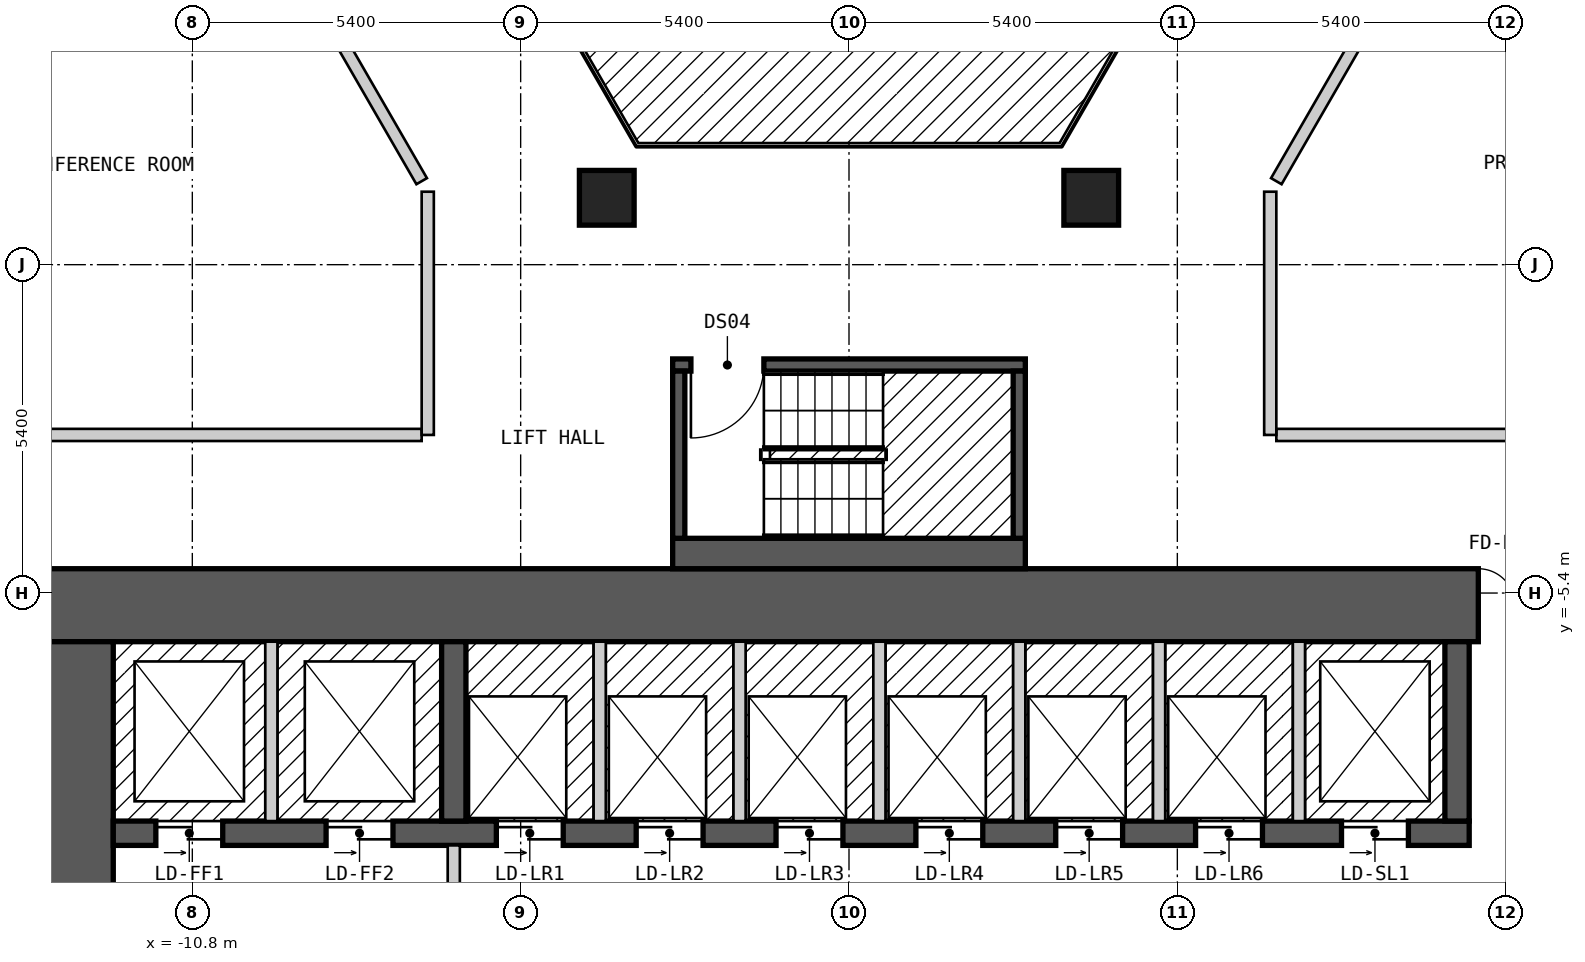
"""IFC4 building model, lengths in metres.
Left out: names, types, materials, properties, quantities, classifications, styles, units other than length and angle.
Written with IfcOpenShell. Run it as: python <this file> out.ifc"""

import sys

from ifc_helpers import new_model, si_unit, direction, frame, frame_2d, origin, origin_2d, place, context, subcontext, project, spatial, rectangle, extrude, element, fill, save


model = new_model("IFC4")
c1 = context("Model", 3, precision=1e-05, world=origin(), true_north=direction((0.0, 1.0)))
c2 = subcontext(c1, "Body", "Model", "MODEL_VIEW")
j1 = project(units=[si_unit("LENGTHUNIT", "METRE"), si_unit("PLANEANGLEUNIT", "RADIAN")], contexts=[c1])
p1 = place(None, origin())
s1 = spatial("IfcSite", under=j1, at=p1, CompositionType="ELEMENT")
p2 = place(p1, origin())
s2 = spatial("IfcBuilding", under=s1, at=p2, CompositionType="ELEMENT")
p3 = place(p2, frame((0.0, 0.0, 56.4)))
s3 = spatial("IfcBuildingStorey", under=s2, at=p3, CompositionType="ELEMENT", Elevation=56.4)
for number, where, z_axis, x_axis in (
    (1, (3.984, 1.1, 0.0), (0.0, 0.0, 1.0), (1.0, 0.0, 0.0)),
    (2, (-3.984, 1.1, 0.0), (0.0, 0.0, 1.0), (1.0, 0.0, 0.0)),
):
    element("IfcColumn", number, at=place(p3, frame(where, z_axis=z_axis, x_axis=x_axis)), inside=s3, PredefinedType="COLUMN", context=c2, shape_type="SweptSolid", body=[
        extrude(rectangle(XDim=0.9, YDim=0.9, at=origin_2d()), origin(), (0.0, 0.0, 1.0), 3.0),
    ])
p4 = place(p3, frame((-13.3, -5.6, 0.0), z_axis=(0.0, 0.0, 1.0), x_axis=(1.0, 0.0, 0.0)))
e3 = element("IfcWall", 3, at=p4, inside=s3, PredefinedType="SHEAR", context=c2, shape_type="SweptSolid", body=[
    extrude(rectangle(XDim=26.6, YDim=1.2, at=frame_2d((13.3, 0.0))), origin(), (0.0, 0.0, 1.0), 2.7),
])
p5 = place(p4, frame((23.65, 0.0, 0.0)))
e4 = element("IfcOpeningElement", 4, at=p5, cuts=e3, PredefinedType="OPENING", context=c2, shape_type="SweptSolid", body=[
    extrude(rectangle(XDim=1.2, YDim=2.1, at=frame_2d((0.6, 1.05))), frame((0.0, 0.61, 0.0), z_axis=(0.0, -1.0, 0.0), x_axis=(1.0, 0.0, 0.0)), (0.0, 0.0, 1.0), 1.22),
])
p6 = place(p3, frame((-12.7, -17.8, 0.0), z_axis=(0.0, 0.0, 1.0), x_axis=(0.0, 1.0, 0.0)))
e5 = element("IfcWall", 5, at=p6, inside=s3, PredefinedType="SHEAR", context=c2, shape_type="SweptSolid", body=[
    extrude(rectangle(XDim=11.6, YDim=1.2, at=frame_2d((5.8, 0.0))), origin(), (0.0, 0.0, 1.0), 2.7),
])
p7 = place(p6, frame((3.6, 0.0, 0.0)))
e6 = element("IfcOpeningElement", 6, at=p7, cuts=e5, PredefinedType="OPENING", context=c2, shape_type="SweptSolid", body=[
    extrude(rectangle(XDim=1.2, YDim=2.1, at=frame_2d((0.6, 1.05))), frame((0.0, 0.61, 0.0), z_axis=(0.0, -1.0, 0.0), x_axis=(1.0, 0.0, 0.0)), (0.0, 0.0, 1.0), 1.22),
])
p8 = place(p3, frame((-12.1, -9.35, 0.0), z_axis=(0.0, 0.0, 1.0), x_axis=(1.0, 0.0, 0.0)))
e7 = element("IfcWall", 7, at=p8, inside=s3, PredefinedType="SHEAR", context=c2, shape_type="SweptSolid", body=[
    extrude(rectangle(XDim=22.3, YDim=0.4, at=frame_2d((11.15, 0.0))), origin(), (0.0, 0.0, 1.0), 2.7),
])
p9 = place(p8, frame((0.7, 0.0, 0.0)))
e8 = element("IfcOpeningElement", 8, at=p9, cuts=e7, PredefinedType="OPENING", context=c2, shape_type="SweptSolid", body=[
    extrude(rectangle(XDim=1.1, YDim=2.1, at=frame_2d((0.55, 1.05))), frame((0.0, 0.21, 0.0), z_axis=(0.0, -1.0, 0.0), x_axis=(1.0, 0.0, 0.0)), (0.0, 0.0, 1.0), 0.42),
])
p10 = place(p8, frame((3.5, 0.0, 0.0)))
e9 = element("IfcOpeningElement", 9, at=p10, cuts=e7, PredefinedType="OPENING", context=c2, shape_type="SweptSolid", body=[
    extrude(rectangle(XDim=1.1, YDim=2.1, at=frame_2d((0.55, 1.05))), frame((0.0, 0.21, 0.0), z_axis=(0.0, -1.0, 0.0), x_axis=(1.0, 0.0, 0.0)), (0.0, 0.0, 1.0), 0.42),
])
p11 = place(p8, frame((6.3, 0.0, 0.0)))
e10 = element("IfcOpeningElement", 10, at=p11, cuts=e7, PredefinedType="OPENING", context=c2, shape_type="SweptSolid", body=[
    extrude(rectangle(XDim=1.1, YDim=2.1, at=frame_2d((0.55, 1.05))), frame((0.0, 0.21, 0.0), z_axis=(0.0, -1.0, 0.0), x_axis=(1.0, 0.0, 0.0)), (0.0, 0.0, 1.0), 0.42),
])
p12 = place(p8, frame((8.6, 0.0, 0.0)))
e11 = element("IfcOpeningElement", 11, at=p12, cuts=e7, PredefinedType="OPENING", context=c2, shape_type="SweptSolid", body=[
    extrude(rectangle(XDim=1.1, YDim=2.1, at=frame_2d((0.55, 1.05))), frame((0.0, 0.21, 0.0), z_axis=(0.0, -1.0, 0.0), x_axis=(1.0, 0.0, 0.0)), (0.0, 0.0, 1.0), 0.42),
])
p13 = place(p8, frame((10.9, 0.0, 0.0)))
e12 = element("IfcOpeningElement", 12, at=p13, cuts=e7, PredefinedType="OPENING", context=c2, shape_type="SweptSolid", body=[
    extrude(rectangle(XDim=1.1, YDim=2.1, at=frame_2d((0.55, 1.05))), frame((0.0, 0.21, 0.0), z_axis=(0.0, -1.0, 0.0), x_axis=(1.0, 0.0, 0.0)), (0.0, 0.0, 1.0), 0.42),
])
p14 = place(p8, frame((13.2, 0.0, 0.0)))
e13 = element("IfcOpeningElement", 13, at=p14, cuts=e7, PredefinedType="OPENING", context=c2, shape_type="SweptSolid", body=[
    extrude(rectangle(XDim=1.1, YDim=2.1, at=frame_2d((0.55, 1.05))), frame((0.0, 0.21, 0.0), z_axis=(0.0, -1.0, 0.0), x_axis=(1.0, 0.0, 0.0)), (0.0, 0.0, 1.0), 0.42),
])
p15 = place(p8, frame((15.5, 0.0, 0.0)))
e14 = element("IfcOpeningElement", 14, at=p15, cuts=e7, PredefinedType="OPENING", context=c2, shape_type="SweptSolid", body=[
    extrude(rectangle(XDim=1.1, YDim=2.1, at=frame_2d((0.55, 1.05))), frame((0.0, 0.21, 0.0), z_axis=(0.0, -1.0, 0.0), x_axis=(1.0, 0.0, 0.0)), (0.0, 0.0, 1.0), 0.42),
])
p16 = place(p8, frame((17.8, 0.0, 0.0)))
e15 = element("IfcOpeningElement", 15, at=p16, cuts=e7, PredefinedType="OPENING", context=c2, shape_type="SweptSolid", body=[
    extrude(rectangle(XDim=1.1, YDim=2.1, at=frame_2d((0.55, 1.05))), frame((0.0, 0.21, 0.0), z_axis=(0.0, -1.0, 0.0), x_axis=(1.0, 0.0, 0.0)), (0.0, 0.0, 1.0), 0.42),
])
p17 = place(p8, frame((20.2, 0.0, 0.0)))
e16 = element("IfcOpeningElement", 16, at=p17, cuts=e7, PredefinedType="OPENING", context=c2, shape_type="SweptSolid", body=[
    extrude(rectangle(XDim=1.1, YDim=2.1, at=frame_2d((0.55, 1.05))), frame((0.0, 0.21, 0.0), z_axis=(0.0, -1.0, 0.0), x_axis=(1.0, 0.0, 0.0)), (0.0, 0.0, 1.0), 0.42),
])
for number, where, z_axis, x_axis in (
    (17, (-6.5, -9.15, 0.0), (0.0, 0.0, 1.0), (0.0, 1.0, 0.0)),
    (18, (10.0, -9.15, 0.0), (0.0, 0.0, 1.0), (0.0, 1.0, 0.0)),
):
    element("IfcWall", number, at=place(p3, frame(where, z_axis=z_axis, x_axis=x_axis)), inside=s3, PredefinedType="SHEAR", context=c2, shape_type="SweptSolid", body=[
        extrude(rectangle(XDim=2.95, YDim=0.4, at=frame_2d((1.475, 0.0))), origin(), (0.0, 0.0, 1.0), 2.7),
    ])
p18 = place(p3, frame((-2.9, -4.75, 0.0), z_axis=(0.0, 0.0, 1.0), x_axis=(1.0, 0.0, 0.0)))
e19 = element("IfcWall", 19, at=p18, inside=s3, PredefinedType="SOLIDWALL", context=c2, shape_type="SweptSolid", body=[
    extrude(rectangle(XDim=5.8, YDim=0.5, at=frame_2d((2.9, 0.0))), origin(), (0.0, 0.0, 1.0), 2.7),
])
p19 = place(p3, frame((-2.9, -1.65, 0.0), z_axis=(0.0, 0.0, 1.0), x_axis=(1.0, 0.0, 0.0)))
e20 = element("IfcWall", 20, at=p19, inside=s3, PredefinedType="SOLIDWALL", context=c2, shape_type="SweptSolid", body=[
    extrude(rectangle(XDim=5.8, YDim=0.2, at=frame_2d((2.9, 0.0))), origin(), (0.0, 0.0, 1.0), 2.7),
])
p20 = place(p19, frame((0.3, 0.0, 0.0)))
e21 = element("IfcOpeningElement", 21, at=p20, cuts=e20, PredefinedType="OPENING", context=c2, shape_type="SweptSolid", body=[
    extrude(rectangle(XDim=1.2, YDim=2.1, at=frame_2d((0.6, 1.05))), frame((0.0, 0.11, 0.0), z_axis=(0.0, -1.0, 0.0), x_axis=(1.0, 0.0, 0.0)), (0.0, 0.0, 1.0), 0.22),
])
for number, where, z_axis, x_axis in (
    (22, (-2.8, -4.5, 0.0), (0.0, 0.0, 1.0), (0.0, 1.0, 0.0)),
    (23, (2.8, -4.5, 0.0), (0.0, 0.0, 1.0), (0.0, 1.0, 0.0)),
):
    element("IfcWall", number, at=place(p3, frame(where, z_axis=z_axis, x_axis=x_axis)), inside=s3, PredefinedType="SOLIDWALL", context=c2, shape_type="SweptSolid", body=[
        extrude(rectangle(XDim=2.75, YDim=0.2, at=frame_2d((1.375, 0.0))), origin(), (0.0, 0.0, 1.0), 2.7),
    ])
p21 = place(p3, frame((-10.796, 7.9, 0.0), z_axis=(0.0, 0.0, 1.0), x_axis=(0.499954271211, -0.866051803703, 0.0)))
e24 = element("IfcWall", 24, at=p21, inside=s3, PredefinedType="PARTITIONING", context=c2, shape_type="SweptSolid", body=[
    extrude(rectangle(XDim=7.536, YDim=0.2, at=frame_2d((3.768, 0.0))), origin(), (0.0, 0.0, 1.0), 2.7),
])
p22 = place(p3, frame((9.18, 15.7, 0.0), z_axis=(0.0, 0.0, 1.0), x_axis=(0.500003652032, -0.866023295272, 0.0)))
e25 = element("IfcWall", 25, at=p22, inside=s3, PredefinedType="PARTITIONING", context=c2, shape_type="SweptSolid", body=[
    extrude(rectangle(XDim=18.012, YDim=0.2, at=frame_2d((9.006, 0.0))), origin(), (0.0, 0.0, 1.0), 2.7),
])
p23 = place(p22, frame((8.556, 0.0, 0.0)))
e26 = element("IfcOpeningElement", 26, at=p23, cuts=e25, PredefinedType="OPENING", context=c2, shape_type="SweptSolid", body=[
    extrude(rectangle(XDim=0.9, YDim=2.1, at=frame_2d((0.45, 1.05))), frame((0.0, 0.11, 0.0), z_axis=(0.0, -1.0, 0.0), x_axis=(1.0, 0.0, 0.0)), (0.0, 0.0, 1.0), 0.22),
])
p24 = place(p3, frame((10.45, 17.9, 0.0), z_axis=(0.0, 0.0, 1.0), x_axis=(0.500034352617, -0.866005569383, 0.0)))
e27 = element("IfcWall", 27, at=p24, inside=s3, PredefinedType="PARTITIONING", context=c2, shape_type="SweptSolid", body=[
    extrude(rectangle(XDim=20.553, YDim=0.2, at=frame_2d((10.276, 0.0))), origin(), (0.0, 0.0, 1.0), 2.7),
])
p25 = place(p24, frame((14.902, 0.0, 0.0)))
e28 = element("IfcOpeningElement", 28, at=p25, cuts=e27, PredefinedType="OPENING", context=c2, shape_type="SweptSolid", body=[
    extrude(rectangle(XDim=1.0, YDim=2.1, at=frame_2d((0.5, 1.05))), frame((0.0, 0.11, 0.0), z_axis=(0.0, -1.0, 0.0), x_axis=(1.0, 0.0, 0.0)), (0.0, 0.0, 1.0), 0.22),
])
p26 = place(p24, frame((4.671, 0.0, 0.0)))
e29 = element("IfcOpeningElement", 29, at=p26, cuts=e27, PredefinedType="OPENING", context=c2, shape_type="SweptSolid", body=[
    extrude(rectangle(XDim=1.0, YDim=2.1, at=frame_2d((0.5, 1.05))), frame((0.0, 0.11, 0.0), z_axis=(0.0, -1.0, 0.0), x_axis=(1.0, 0.0, 0.0)), (0.0, 0.0, 1.0), 0.22),
])
for number, where, z_axis, x_axis in (
    (30, (-15.4, -2.8, 0.0), (0.0, 0.0, 1.0), (1.0, 0.0, 0.0)),
    (31, (7.028, -2.8, 0.0), (0.0, 0.0, 1.0), (1.0, 0.0, 0.0)),
):
    element("IfcWall", number, at=place(p3, frame(where, z_axis=z_axis, x_axis=x_axis)), inside=s3, PredefinedType="PARTITIONING", context=c2, shape_type="SweptSolid", body=[
        extrude(rectangle(XDim=8.372, YDim=0.2, at=frame_2d((4.186, 0.0))), origin(), (0.0, 0.0, 1.0), 2.7),
    ])
p27 = place(p3, frame((7.028, 1.373, 0.0), z_axis=(0.0, 0.0, 1.0), x_axis=(0.49998574534, 0.86603363356, 0.0)))
e32 = element("IfcWall", 32, at=p27, inside=s3, PredefinedType="PARTITIONING", context=c2, shape_type="SweptSolid", body=[
    extrude(rectangle(XDim=7.652, YDim=0.2, at=frame_2d((3.826, 0.0))), origin(), (0.0, 0.0, 1.0), 2.7),
])
p28 = place(p3, frame((-18.244, -0.001, 0.0), z_axis=(0.0, 0.0, 1.0), x_axis=(0.499962999376, 0.866046765051, 0.0)))
e33 = element("IfcWall", 33, at=p28, inside=s3, PredefinedType="PARTITIONING", context=c2, shape_type="SweptSolid", body=[
    extrude(rectangle(XDim=18.245, YDim=0.2, at=frame_2d((9.123, 0.0))), origin(), (0.0, 0.0, 1.0), 2.7),
])
p29 = place(p28, frame((8.672, 0.0, 0.0)))
e34 = element("IfcOpeningElement", 34, at=p29, cuts=e33, PredefinedType="OPENING", context=c2, shape_type="SweptSolid", body=[
    extrude(rectangle(XDim=0.9, YDim=2.1, at=frame_2d((0.45, 1.05))), frame((0.0, 0.11, 0.0), z_axis=(0.0, -1.0, 0.0), x_axis=(1.0, 0.0, 0.0)), (0.0, 0.0, 1.0), 0.22),
])
p30 = place(p3, frame((-20.727, 0.099, 0.0), z_axis=(0.0, 0.0, 1.0), x_axis=(0.499993204491, 0.866029327138, 0.0)))
e35 = element("IfcWall", 35, at=p30, inside=s3, PredefinedType="PARTITIONING", context=c2, shape_type="SweptSolid", body=[
    extrude(rectangle(XDim=20.554, YDim=0.2, at=frame_2d((10.277, 0.0))), origin(), (0.0, 0.0, 1.0), 2.7),
])
p31 = place(p30, frame((9.776, 0.0, 0.0)))
e36 = element("IfcOpeningElement", 36, at=p31, cuts=e35, PredefinedType="OPENING", context=c2, shape_type="SweptSolid", body=[
    extrude(rectangle(XDim=1.0, YDim=2.1, at=frame_2d((0.5, 1.05))), frame((0.0, 0.11, 0.0), z_axis=(0.0, -1.0, 0.0), x_axis=(1.0, 0.0, 0.0)), (0.0, 0.0, 1.0), 0.22),
])
p32 = place(p30, frame((4.673, 0.0, 0.0)))
e37 = element("IfcOpeningElement", 37, at=p32, cuts=e35, PredefinedType="OPENING", context=c2, shape_type="SweptSolid", body=[
    extrude(rectangle(XDim=1.0, YDim=2.1, at=frame_2d((0.5, 1.05))), frame((0.0, 0.11, 0.0), z_axis=(0.0, -1.0, 0.0), x_axis=(1.0, 0.0, 0.0)), (0.0, 0.0, 1.0), 0.22),
])
p33 = place(p30, frame((14.88, 0.0, 0.0)))
e38 = element("IfcOpeningElement", 38, at=p33, cuts=e35, PredefinedType="OPENING", context=c2, shape_type="SweptSolid", body=[
    extrude(rectangle(XDim=1.0, YDim=2.1, at=frame_2d((0.5, 1.05))), frame((0.0, 0.11, 0.0), z_axis=(0.0, -1.0, 0.0), x_axis=(1.0, 0.0, 0.0)), (0.0, 0.0, 1.0), 0.22),
])
for number, where, z_axis, x_axis in (
    (39, (6.928, -2.8, 0.0), (0.0, 0.0, 1.0), (0.0, 1.0, 0.0)),
    (40, (-6.928, -2.8, 0.0), (0.0, 0.0, 1.0), (0.0, 1.0, 0.0)),
):
    element("IfcWall", number, at=place(p3, frame(where, z_axis=z_axis, x_axis=x_axis)), inside=s3, PredefinedType="PARTITIONING", context=c2, shape_type="SweptSolid", body=[
        extrude(rectangle(XDim=4.0, YDim=0.2, at=frame_2d((2.0, 0.0))), origin(), (0.0, 0.0, 1.0), 2.7),
    ])
p34 = place(p3, frame((-9.5, -9.15, 0.0), z_axis=(0.0, 0.0, 1.0), x_axis=(0.0, 1.0, 0.0)))
e41 = element("IfcWall", 41, at=p34, inside=s3, PredefinedType="SOLIDWALL", context=c2, shape_type="SweptSolid", body=[
    extrude(rectangle(XDim=2.95, YDim=0.2, at=frame_2d((1.475, 0.0))), origin(), (0.0, 0.0, 1.0), 2.7),
])
p35 = place(p3, frame((-6.5, -14.45, 0.0), z_axis=(0.0, 0.0, 1.0), x_axis=(0.0, 1.0, 0.0)))
e42 = element("IfcWall", 42, at=p35, inside=s3, PredefinedType="PARTITIONING", context=c2, shape_type="SweptSolid", body=[
    extrude(rectangle(XDim=4.9, YDim=0.2, at=frame_2d((2.45, 0.0))), origin(), (0.0, 0.0, 1.0), 2.7),
])
p36 = place(p35, frame((3.15, 0.0, 0.0), z_axis=(0.0, 0.0, 1.0), x_axis=(-1.0, 0.0, 0.0)))
e43 = element("IfcOpeningElement", 43, at=p36, cuts=e42, PredefinedType="OPENING", context=c2, shape_type="SweptSolid", body=[
    extrude(rectangle(XDim=1.4, YDim=2.1, at=frame_2d((0.7, 1.05))), frame((0.0, 0.11, 0.0), z_axis=(0.0, -1.0, 0.0), x_axis=(1.0, 0.0, 0.0)), (0.0, 0.0, 1.0), 0.22),
])
for number, where, z_axis, x_axis in (
    (44, (-4.1, -9.15, 0.0), (0.0, 0.0, 1.0), (0.0, 1.0, 0.0)),
    (45, (-1.8, -9.15, 0.0), (0.0, 0.0, 1.0), (0.0, 1.0, 0.0)),
    (46, (0.5, -9.15, 0.0), (0.0, 0.0, 1.0), (0.0, 1.0, 0.0)),
    (47, (2.8, -9.15, 0.0), (0.0, 0.0, 1.0), (0.0, 1.0, 0.0)),
    (48, (5.1, -9.15, 0.0), (0.0, 0.0, 1.0), (0.0, 1.0, 0.0)),
    (49, (7.4, -9.15, 0.0), (0.0, 0.0, 1.0), (0.0, 1.0, 0.0)),
):
    element("IfcWall", number, at=place(p3, frame(where, z_axis=z_axis, x_axis=x_axis)), inside=s3, PredefinedType="SOLIDWALL", context=c2, shape_type="SweptSolid", body=[
        extrude(rectangle(XDim=2.95, YDim=0.2, at=frame_2d((1.475, 0.0))), origin(), (0.0, 0.0, 1.0), 2.7),
    ])
p37 = place(p20, origin())
e50 = element("IfcDoor", 50, at=p37, inside=s3, OperationType="SINGLE_SWING_LEFT", PredefinedType="DOOR", context=c2, shape_type="SweptSolid", body=[
    extrude(rectangle(XDim=1.2, YDim=2.1, at=frame_2d((0.6, 1.05))), frame((0.0, 0.025, 0.0), z_axis=(0.0, -1.0, 0.0), x_axis=(1.0, 0.0, 0.0)), (0.0, 0.0, 1.0), 0.05),
])
fill(e21, e50)
p38 = place(p9, origin())
e51 = element("IfcDoor", 51, at=p38, inside=s3, OperationType="DOUBLE_DOOR_SLIDING", PredefinedType="DOOR", context=c2, shape_type="SweptSolid", body=[
    extrude(rectangle(XDim=1.1, YDim=2.1, at=frame_2d((0.55, 1.05))), frame((0.0, 0.025, 0.0), z_axis=(0.0, -1.0, 0.0), x_axis=(1.0, 0.0, 0.0)), (0.0, 0.0, 1.0), 0.05),
])
fill(e8, e51)
p39 = place(p10, origin())
e52 = element("IfcDoor", 52, at=p39, inside=s3, OperationType="DOUBLE_DOOR_SLIDING", PredefinedType="DOOR", context=c2, shape_type="SweptSolid", body=[
    extrude(rectangle(XDim=1.1, YDim=2.1, at=frame_2d((0.55, 1.05))), frame((0.0, 0.025, 0.0), z_axis=(0.0, -1.0, 0.0), x_axis=(1.0, 0.0, 0.0)), (0.0, 0.0, 1.0), 0.05),
])
fill(e9, e52)
p40 = place(p11, origin())
e53 = element("IfcDoor", 53, at=p40, inside=s3, OperationType="DOUBLE_DOOR_SLIDING", PredefinedType="DOOR", context=c2, shape_type="SweptSolid", body=[
    extrude(rectangle(XDim=1.1, YDim=2.1, at=frame_2d((0.55, 1.05))), frame((0.0, 0.025, 0.0), z_axis=(0.0, -1.0, 0.0), x_axis=(1.0, 0.0, 0.0)), (0.0, 0.0, 1.0), 0.05),
])
fill(e10, e53)
p41 = place(p12, origin())
e54 = element("IfcDoor", 54, at=p41, inside=s3, OperationType="DOUBLE_DOOR_SLIDING", PredefinedType="DOOR", context=c2, shape_type="SweptSolid", body=[
    extrude(rectangle(XDim=1.1, YDim=2.1, at=frame_2d((0.55, 1.05))), frame((0.0, 0.025, 0.0), z_axis=(0.0, -1.0, 0.0), x_axis=(1.0, 0.0, 0.0)), (0.0, 0.0, 1.0), 0.05),
])
fill(e11, e54)
p42 = place(p13, origin())
e55 = element("IfcDoor", 55, at=p42, inside=s3, OperationType="DOUBLE_DOOR_SLIDING", PredefinedType="DOOR", context=c2, shape_type="SweptSolid", body=[
    extrude(rectangle(XDim=1.1, YDim=2.1, at=frame_2d((0.55, 1.05))), frame((0.0, 0.025, 0.0), z_axis=(0.0, -1.0, 0.0), x_axis=(1.0, 0.0, 0.0)), (0.0, 0.0, 1.0), 0.05),
])
fill(e12, e55)
p43 = place(p14, origin())
e56 = element("IfcDoor", 56, at=p43, inside=s3, OperationType="DOUBLE_DOOR_SLIDING", PredefinedType="DOOR", context=c2, shape_type="SweptSolid", body=[
    extrude(rectangle(XDim=1.1, YDim=2.1, at=frame_2d((0.55, 1.05))), frame((0.0, 0.025, 0.0), z_axis=(0.0, -1.0, 0.0), x_axis=(1.0, 0.0, 0.0)), (0.0, 0.0, 1.0), 0.05),
])
fill(e13, e56)
p44 = place(p15, origin())
e57 = element("IfcDoor", 57, at=p44, inside=s3, OperationType="DOUBLE_DOOR_SLIDING", PredefinedType="DOOR", context=c2, shape_type="SweptSolid", body=[
    extrude(rectangle(XDim=1.1, YDim=2.1, at=frame_2d((0.55, 1.05))), frame((0.0, 0.025, 0.0), z_axis=(0.0, -1.0, 0.0), x_axis=(1.0, 0.0, 0.0)), (0.0, 0.0, 1.0), 0.05),
])
fill(e14, e57)
p45 = place(p16, origin())
e58 = element("IfcDoor", 58, at=p45, inside=s3, OperationType="DOUBLE_DOOR_SLIDING", PredefinedType="DOOR", context=c2, shape_type="SweptSolid", body=[
    extrude(rectangle(XDim=1.1, YDim=2.1, at=frame_2d((0.55, 1.05))), frame((0.0, 0.025, 0.0), z_axis=(0.0, -1.0, 0.0), x_axis=(1.0, 0.0, 0.0)), (0.0, 0.0, 1.0), 0.05),
])
fill(e15, e58)
p46 = place(p17, origin())
e59 = element("IfcDoor", 59, at=p46, inside=s3, OperationType="DOUBLE_DOOR_SLIDING", PredefinedType="DOOR", context=c2, shape_type="SweptSolid", body=[
    extrude(rectangle(XDim=1.1, YDim=2.1, at=frame_2d((0.55, 1.05))), frame((0.0, 0.025, 0.0), z_axis=(0.0, -1.0, 0.0), x_axis=(1.0, 0.0, 0.0)), (0.0, 0.0, 1.0), 0.05),
])
fill(e16, e59)
p47 = place(p5, origin())
e60 = element("IfcDoor", 60, at=p47, inside=s3, OperationType="DOUBLE_DOOR_SINGLE_SWING", PredefinedType="DOOR", context=c2, shape_type="SweptSolid", body=[
    extrude(rectangle(XDim=1.2, YDim=2.1, at=frame_2d((0.6, 1.05))), frame((0.0, 0.025, 0.0), z_axis=(0.0, -1.0, 0.0), x_axis=(1.0, 0.0, 0.0)), (0.0, 0.0, 1.0), 0.05),
])
fill(e4, e60)
save(model, sys.argv[1])
